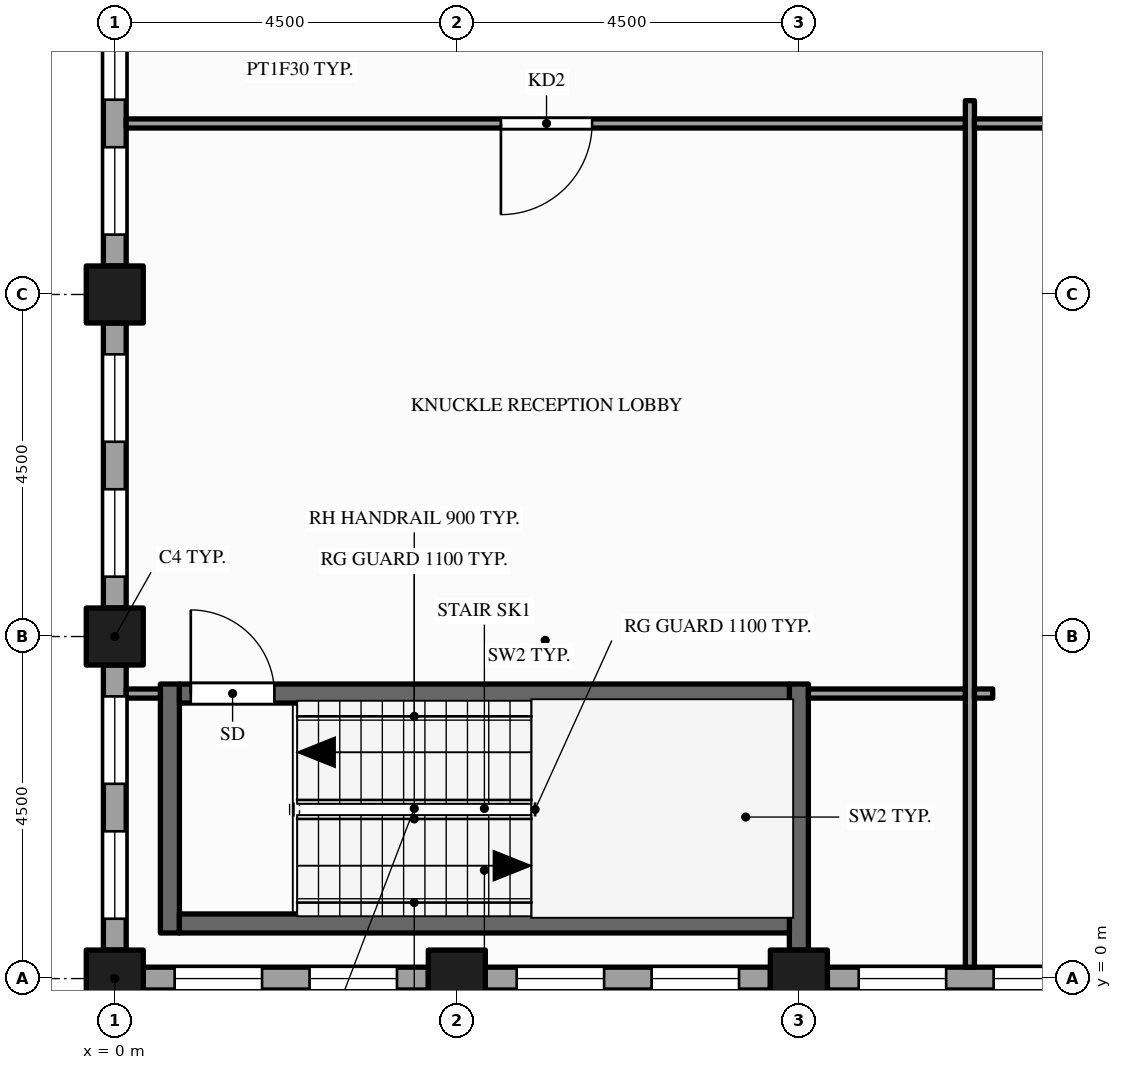
"""IFC4 building model, lengths in metres.
Left out: names, types, materials, properties, quantities, classifications, styles, units other than length and angle.
Written with IfcOpenShell. Run it as: python <this file> out.ifc"""

import sys

from ifc_helpers import new_model, si_unit, direction, frame, frame_2d, origin, origin_2d, place, context, subcontext, project, spatial, rectangle, hollow_rectangle, extrude, element, fill, save


model = new_model("IFC4")
c1 = context("Model", 3, precision=1e-05, world=origin(), true_north=direction((0.0, 1.0)))
c2 = subcontext(c1, "Body", "Model", "MODEL_VIEW")
j1 = project(units=[si_unit("LENGTHUNIT", "METRE"), si_unit("PLANEANGLEUNIT", "RADIAN")], contexts=[c1])
p1 = place(None, origin())
s1 = spatial("IfcSite", under=j1, at=p1, CompositionType="ELEMENT")
p2 = place(p1, origin())
s2 = spatial("IfcBuilding", under=s1, at=p2, CompositionType="ELEMENT")
p3 = place(p2, frame((0.0, 0.0, 235.0)))
s3 = spatial("IfcBuildingStorey", under=s2, at=p3, CompositionType="ELEMENT", Elevation=235.0)
for number, where, z_axis, x_axis in (
    (1, (0.0, 0.0, -0.15), (0.0, 0.0, 1.0), (1.0, 0.0, 0.0)),
    (2, (0.0, 4.5, -0.15), (0.0, 0.0, 1.0), (1.0, 0.0, 0.0)),
    (3, (0.0, 9.0, -0.15), (0.0, 0.0, 1.0), (1.0, 0.0, 0.0)),
    (4, (4.5, 0.0, -0.15), (0.0, 0.0, 1.0), (1.0, 0.0, 0.0)),
    (5, (9.0, 0.0, -0.15), (0.0, 0.0, 1.0), (1.0, 0.0, 0.0)),
):
    element("IfcColumn", number, at=place(p3, frame(where, z_axis=z_axis, x_axis=x_axis)), inside=s3, PredefinedType="COLUMN", context=c2, shape_type="SweptSolid", body=[
        extrude(hollow_rectangle(XDim=0.75, YDim=0.75, WallThickness=0.036, at=origin_2d()), origin(), (0.0, 0.0, 1.0), 4.0),
    ])
p4 = place(p3, frame((0.0, 13.125, 0.0), z_axis=(0.0, 0.0, 1.0), x_axis=(0.0, -1.0, 0.0)))
e6 = element("IfcWall", 6, at=p4, inside=s3, PredefinedType="STANDARD", context=c2, shape_type="SweptSolid", body=[
    extrude(rectangle(XDim=3.75, YDim=0.3, at=frame_2d((1.875, 0.0))), origin(), (0.0, 0.0, 1.0), 3.157),
])
p5 = place(p4, frame((0.413, 0.0, 0.9)))
e7 = element("IfcOpeningElement", 7, at=p5, cuts=e6, PredefinedType="OPENING", context=c2, shape_type="SweptSolid", body=[
    extrude(rectangle(XDim=1.15, YDim=2.0, at=frame_2d((0.575, 1.0))), frame((0.0, 0.16, 0.0), z_axis=(0.0, -1.0, 0.0), x_axis=(1.0, 0.0, 0.0)), (0.0, 0.0, 1.0), 0.32),
])
p6 = place(p4, frame((2.188, 0.0, 0.9)))
e8 = element("IfcOpeningElement", 8, at=p6, cuts=e6, PredefinedType="OPENING", context=c2, shape_type="SweptSolid", body=[
    extrude(rectangle(XDim=1.15, YDim=2.0, at=frame_2d((0.575, 1.0))), frame((0.0, 0.16, 0.0), z_axis=(0.0, -1.0, 0.0), x_axis=(1.0, 0.0, 0.0)), (0.0, 0.0, 1.0), 0.32),
])
p7 = place(p3, frame((0.0, 8.625, 0.0), z_axis=(0.0, 0.0, 1.0), x_axis=(0.0, -1.0, 0.0)))
e9 = element("IfcWall", 9, at=p7, inside=s3, PredefinedType="STANDARD", context=c2, shape_type="SweptSolid", body=[
    extrude(rectangle(XDim=3.75, YDim=0.3, at=frame_2d((1.875, 0.0))), origin(), (0.0, 0.0, 1.0), 3.157),
])
p8 = place(p7, frame((0.413, 0.0, 0.9)))
e10 = element("IfcOpeningElement", 10, at=p8, cuts=e9, PredefinedType="OPENING", context=c2, shape_type="SweptSolid", body=[
    extrude(rectangle(XDim=1.15, YDim=2.0, at=frame_2d((0.575, 1.0))), frame((0.0, 0.16, 0.0), z_axis=(0.0, -1.0, 0.0), x_axis=(1.0, 0.0, 0.0)), (0.0, 0.0, 1.0), 0.32),
])
p9 = place(p7, frame((2.188, 0.0, 0.9)))
e11 = element("IfcOpeningElement", 11, at=p9, cuts=e9, PredefinedType="OPENING", context=c2, shape_type="SweptSolid", body=[
    extrude(rectangle(XDim=1.15, YDim=2.0, at=frame_2d((0.575, 1.0))), frame((0.0, 0.16, 0.0), z_axis=(0.0, -1.0, 0.0), x_axis=(1.0, 0.0, 0.0)), (0.0, 0.0, 1.0), 0.32),
])
p10 = place(p3, frame((0.0, 4.125, 0.0), z_axis=(0.0, 0.0, 1.0), x_axis=(0.0, -1.0, 0.0)))
e12 = element("IfcWall", 12, at=p10, inside=s3, PredefinedType="STANDARD", context=c2, shape_type="SweptSolid", body=[
    extrude(rectangle(XDim=3.75, YDim=0.3, at=frame_2d((1.875, 0.0))), origin(), (0.0, 0.0, 1.0), 3.157),
])
p11 = place(p10, frame((0.413, 0.0, 0.9)))
e13 = element("IfcOpeningElement", 13, at=p11, cuts=e12, PredefinedType="OPENING", context=c2, shape_type="SweptSolid", body=[
    extrude(rectangle(XDim=1.15, YDim=2.0, at=frame_2d((0.575, 1.0))), frame((0.0, 0.16, 0.0), z_axis=(0.0, -1.0, 0.0), x_axis=(1.0, 0.0, 0.0)), (0.0, 0.0, 1.0), 0.32),
])
p12 = place(p10, frame((2.188, 0.0, 0.9)))
e14 = element("IfcOpeningElement", 14, at=p12, cuts=e12, PredefinedType="OPENING", context=c2, shape_type="SweptSolid", body=[
    extrude(rectangle(XDim=1.15, YDim=2.0, at=frame_2d((0.575, 1.0))), frame((0.0, 0.16, 0.0), z_axis=(0.0, -1.0, 0.0), x_axis=(1.0, 0.0, 0.0)), (0.0, 0.0, 1.0), 0.32),
])
p13 = place(p3, frame((0.375, 0.0, 0.0), z_axis=(0.0, 0.0, 1.0), x_axis=(1.0, 0.0, 0.0)))
e15 = element("IfcWall", 15, at=p13, inside=s3, PredefinedType="STANDARD", context=c2, shape_type="SweptSolid", body=[
    extrude(rectangle(XDim=3.75, YDim=0.3, at=frame_2d((1.875, 0.0))), origin(), (0.0, 0.0, 1.0), 3.157),
])
p14 = place(p13, frame((0.413, 0.0, 0.9)))
e16 = element("IfcOpeningElement", 16, at=p14, cuts=e15, PredefinedType="OPENING", context=c2, shape_type="SweptSolid", body=[
    extrude(rectangle(XDim=1.15, YDim=2.0, at=frame_2d((0.575, 1.0))), frame((0.0, 0.16, 0.0), z_axis=(0.0, -1.0, 0.0), x_axis=(1.0, 0.0, 0.0)), (0.0, 0.0, 1.0), 0.32),
])
p15 = place(p13, frame((2.188, 0.0, 0.9)))
e17 = element("IfcOpeningElement", 17, at=p15, cuts=e15, PredefinedType="OPENING", context=c2, shape_type="SweptSolid", body=[
    extrude(rectangle(XDim=1.15, YDim=2.0, at=frame_2d((0.575, 1.0))), frame((0.0, 0.16, 0.0), z_axis=(0.0, -1.0, 0.0), x_axis=(1.0, 0.0, 0.0)), (0.0, 0.0, 1.0), 0.32),
])
p16 = place(p3, frame((4.875, 0.0, 0.0), z_axis=(0.0, 0.0, 1.0), x_axis=(1.0, 0.0, 0.0)))
e18 = element("IfcWall", 18, at=p16, inside=s3, PredefinedType="STANDARD", context=c2, shape_type="SweptSolid", body=[
    extrude(rectangle(XDim=3.75, YDim=0.3, at=frame_2d((1.875, 0.0))), origin(), (0.0, 0.0, 1.0), 3.157),
])
p17 = place(p16, frame((0.413, 0.0, 0.9)))
e19 = element("IfcOpeningElement", 19, at=p17, cuts=e18, PredefinedType="OPENING", context=c2, shape_type="SweptSolid", body=[
    extrude(rectangle(XDim=1.15, YDim=2.0, at=frame_2d((0.575, 1.0))), frame((0.0, 0.16, 0.0), z_axis=(0.0, -1.0, 0.0), x_axis=(1.0, 0.0, 0.0)), (0.0, 0.0, 1.0), 0.32),
])
p18 = place(p16, frame((2.188, 0.0, 0.9)))
e20 = element("IfcOpeningElement", 20, at=p18, cuts=e18, PredefinedType="OPENING", context=c2, shape_type="SweptSolid", body=[
    extrude(rectangle(XDim=1.15, YDim=2.0, at=frame_2d((0.575, 1.0))), frame((0.0, 0.16, 0.0), z_axis=(0.0, -1.0, 0.0), x_axis=(1.0, 0.0, 0.0)), (0.0, 0.0, 1.0), 0.32),
])
p19 = place(p3, frame((9.375, 0.0, 0.0), z_axis=(0.0, 0.0, 1.0), x_axis=(1.0, 0.0, 0.0)))
e21 = element("IfcWall", 21, at=p19, inside=s3, PredefinedType="STANDARD", context=c2, shape_type="SweptSolid", body=[
    extrude(rectangle(XDim=3.75, YDim=0.3, at=frame_2d((1.875, 0.0))), origin(), (0.0, 0.0, 1.0), 2.87),
])
p20 = place(p19, frame((0.413, 0.0, 0.9)))
e22 = element("IfcOpeningElement", 22, at=p20, cuts=e21, PredefinedType="OPENING", context=c2, shape_type="SweptSolid", body=[
    extrude(rectangle(XDim=1.15, YDim=1.75, at=frame_2d((0.575, 0.875))), frame((0.0, 0.16, 0.0), z_axis=(0.0, -1.0, 0.0), x_axis=(1.0, 0.0, 0.0)), (0.0, 0.0, 1.0), 0.32),
])
p21 = place(p19, frame((2.188, 0.0, 0.9)))
e23 = element("IfcOpeningElement", 23, at=p21, cuts=e21, PredefinedType="OPENING", context=c2, shape_type="SweptSolid", body=[
    extrude(rectangle(XDim=1.15, YDim=1.75, at=frame_2d((0.575, 0.875))), frame((0.0, 0.16, 0.0), z_axis=(0.0, -1.0, 0.0), x_axis=(1.0, 0.0, 0.0)), (0.0, 0.0, 1.0), 0.32),
])
p22 = place(p3, frame((0.725, 0.6, 0.0), z_axis=(0.0, 0.0, 1.0), x_axis=(0.0, 1.0, 0.0)))
e24 = element("IfcWall", 24, at=p22, inside=s3, PredefinedType="SHEAR", context=c2, shape_type="SweptSolid", body=[
    extrude(rectangle(XDim=3.275, YDim=0.25, at=frame_2d((1.637, 0.0))), origin(), (0.0, 0.0, 1.0), 3.85),
])
p23 = place(p3, frame((9.0, 0.375, 0.0), z_axis=(0.0, 0.0, 1.0), x_axis=(0.0, 1.0, 0.0)))
e25 = element("IfcWall", 25, at=p23, inside=s3, PredefinedType="SHEAR", context=c2, shape_type="SweptSolid", body=[
    extrude(rectangle(XDim=3.5, YDim=0.25, at=frame_2d((1.75, 0.0))), origin(), (0.0, 0.0, 1.0), 3.85),
])
p24 = place(p3, frame((11.25, 0.15, 0.0), z_axis=(0.0, 0.0, 1.0), x_axis=(0.0, 1.0, 0.0)))
e26 = element("IfcWall", 26, at=p24, inside=s3, PredefinedType="PARTITIONING", context=c2, shape_type="SweptSolid", body=[
    extrude(rectangle(XDim=11.4, YDim=0.12, at=frame_2d((5.7, 0.0))), origin(), (0.0, 0.0, 1.0), 2.87),
])
p25 = place(p3, frame((0.85, 0.725, 0.0), z_axis=(0.0, 0.0, 1.0), x_axis=(1.0, 0.0, 0.0)))
e27 = element("IfcWall", 27, at=p25, inside=s3, PredefinedType="SHEAR", context=c2, shape_type="SweptSolid", body=[
    extrude(rectangle(XDim=8.025, YDim=0.25, at=frame_2d((4.012, 0.0))), origin(), (0.0, 0.0, 1.0), 3.85),
])
p26 = place(p3, frame((0.15, 3.75, 0.0), z_axis=(0.0, 0.0, 1.0), x_axis=(1.0, 0.0, 0.0)))
e28 = element("IfcWall", 28, at=p26, inside=s3, PredefinedType="PARTITIONING", context=c2, shape_type="SweptSolid", body=[
    extrude(rectangle(XDim=0.45, YDim=0.12, at=frame_2d((0.225, 0.0))), origin(), (0.0, 0.0, 1.0), 3.85),
])
p27 = place(p3, frame((0.85, 3.75, 0.0), z_axis=(0.0, 0.0, 1.0), x_axis=(1.0, 0.0, 0.0)))
e29 = element("IfcWall", 29, at=p27, inside=s3, PredefinedType="SHEAR", context=c2, shape_type="SweptSolid", body=[
    extrude(rectangle(XDim=8.025, YDim=0.25, at=frame_2d((4.012, 0.0))), origin(), (0.0, 0.0, 1.0), 3.85),
])
p28 = place(p27, frame((0.15, 0.0, 0.0)))
e30 = element("IfcOpeningElement", 30, at=p28, cuts=e29, PredefinedType="OPENING", context=c2, shape_type="SweptSolid", body=[
    extrude(rectangle(XDim=1.1, YDim=2.1, at=frame_2d((0.55, 1.05))), frame((0.0, 0.135, 0.0), z_axis=(0.0, -1.0, 0.0), x_axis=(1.0, 0.0, 0.0)), (0.0, 0.0, 1.0), 0.27),
])
p29 = place(p3, frame((9.125, 3.75, 0.0), z_axis=(0.0, 0.0, 1.0), x_axis=(1.0, 0.0, 0.0)))
e31 = element("IfcWall", 31, at=p29, inside=s3, PredefinedType="PARTITIONING", context=c2, shape_type="SweptSolid", body=[
    extrude(rectangle(XDim=2.065, YDim=0.12, at=frame_2d((1.032, 0.0))), origin(), (0.0, 0.0, 1.0), 2.87),
])
p30 = place(p3, frame((11.31, 3.75, 0.0), z_axis=(0.0, 0.0, 1.0), x_axis=(1.0, 0.0, 0.0)))
e32 = element("IfcWall", 32, at=p30, inside=s3, PredefinedType="PARTITIONING", context=c2, shape_type="SweptSolid", body=[
    extrude(rectangle(XDim=0.24, YDim=0.12, at=frame_2d((0.12, 0.0))), origin(), (0.0, 0.0, 1.0), 2.87),
])
p31 = place(p3, frame((0.15, 11.25, 0.0), z_axis=(0.0, 0.0, 1.0), x_axis=(1.0, 0.0, 0.0)))
e33 = element("IfcWall", 33, at=p31, inside=s3, PredefinedType="PARTITIONING", context=c2, shape_type="SweptSolid", body=[
    extrude(rectangle(XDim=11.04, YDim=0.12, at=frame_2d((5.52, 0.0))), origin(), (0.0, 0.0, 1.0), 2.87),
])
p32 = place(p31, frame((4.93, 0.0, 0.0)))
e34 = element("IfcOpeningElement", 34, at=p32, cuts=e33, PredefinedType="OPENING", context=c2, shape_type="SweptSolid", body=[
    extrude(rectangle(XDim=1.2, YDim=2.1, at=frame_2d((0.6, 1.05))), frame((0.0, 0.07, 0.0), z_axis=(0.0, -1.0, 0.0), x_axis=(1.0, 0.0, 0.0)), (0.0, 0.0, 1.0), 0.14),
])
p33 = place(p3, frame((11.31, 11.25, 0.0), z_axis=(0.0, 0.0, 1.0), x_axis=(1.0, 0.0, 0.0)))
e35 = element("IfcWall", 35, at=p33, inside=s3, PredefinedType="PARTITIONING", context=c2, shape_type="SweptSolid", body=[
    extrude(rectangle(XDim=4.38, YDim=0.12, at=frame_2d((2.19, 0.0))), origin(), (0.0, 0.0, 1.0), 2.87),
])
p34 = place(p33, frame((1.69, 0.0, 0.0)))
e36 = element("IfcOpeningElement", 36, at=p34, cuts=e35, PredefinedType="OPENING", context=c2, shape_type="SweptSolid", body=[
    extrude(rectangle(XDim=1.0, YDim=2.1, at=frame_2d((0.5, 1.05))), frame((0.0, 0.07, 0.0), z_axis=(0.0, -1.0, 0.0), x_axis=(1.0, 0.0, 0.0)), (0.0, 0.0, 1.0), 0.14),
])
p35 = place(p5, origin())
e37 = element("IfcWindow", 37, at=p35, inside=s3, PartitioningType="SINGLE_PANEL", PredefinedType="WINDOW", context=c2, shape_type="SweptSolid", body=[
    extrude(rectangle(XDim=1.15, YDim=2.0, at=frame_2d((0.575, 1.0))), frame((0.0, 0.03, 0.0), z_axis=(0.0, -1.0, 0.0), x_axis=(1.0, 0.0, 0.0)), (0.0, 0.0, 1.0), 0.06),
])
fill(e7, e37)
p36 = place(p6, origin())
e38 = element("IfcWindow", 38, at=p36, inside=s3, PartitioningType="SINGLE_PANEL", PredefinedType="WINDOW", context=c2, shape_type="SweptSolid", body=[
    extrude(rectangle(XDim=1.15, YDim=2.0, at=frame_2d((0.575, 1.0))), frame((0.0, 0.03, 0.0), z_axis=(0.0, -1.0, 0.0), x_axis=(1.0, 0.0, 0.0)), (0.0, 0.0, 1.0), 0.06),
])
fill(e8, e38)
p37 = place(p8, origin())
e39 = element("IfcWindow", 39, at=p37, inside=s3, PartitioningType="SINGLE_PANEL", PredefinedType="WINDOW", context=c2, shape_type="SweptSolid", body=[
    extrude(rectangle(XDim=1.15, YDim=2.0, at=frame_2d((0.575, 1.0))), frame((0.0, 0.03, 0.0), z_axis=(0.0, -1.0, 0.0), x_axis=(1.0, 0.0, 0.0)), (0.0, 0.0, 1.0), 0.06),
])
fill(e10, e39)
p38 = place(p9, origin())
e40 = element("IfcWindow", 40, at=p38, inside=s3, PartitioningType="SINGLE_PANEL", PredefinedType="WINDOW", context=c2, shape_type="SweptSolid", body=[
    extrude(rectangle(XDim=1.15, YDim=2.0, at=frame_2d((0.575, 1.0))), frame((0.0, 0.03, 0.0), z_axis=(0.0, -1.0, 0.0), x_axis=(1.0, 0.0, 0.0)), (0.0, 0.0, 1.0), 0.06),
])
fill(e11, e40)
p39 = place(p11, origin())
e41 = element("IfcWindow", 41, at=p39, inside=s3, PartitioningType="SINGLE_PANEL", PredefinedType="WINDOW", context=c2, shape_type="SweptSolid", body=[
    extrude(rectangle(XDim=1.15, YDim=2.0, at=frame_2d((0.575, 1.0))), frame((0.0, 0.03, 0.0), z_axis=(0.0, -1.0, 0.0), x_axis=(1.0, 0.0, 0.0)), (0.0, 0.0, 1.0), 0.06),
])
fill(e13, e41)
p40 = place(p12, origin())
e42 = element("IfcWindow", 42, at=p40, inside=s3, PartitioningType="SINGLE_PANEL", PredefinedType="WINDOW", context=c2, shape_type="SweptSolid", body=[
    extrude(rectangle(XDim=1.15, YDim=2.0, at=frame_2d((0.575, 1.0))), frame((0.0, 0.03, 0.0), z_axis=(0.0, -1.0, 0.0), x_axis=(1.0, 0.0, 0.0)), (0.0, 0.0, 1.0), 0.06),
])
fill(e14, e42)
p41 = place(p14, origin())
e43 = element("IfcWindow", 43, at=p41, inside=s3, PartitioningType="SINGLE_PANEL", PredefinedType="WINDOW", context=c2, shape_type="SweptSolid", body=[
    extrude(rectangle(XDim=1.15, YDim=2.0, at=frame_2d((0.575, 1.0))), frame((0.0, 0.03, 0.0), z_axis=(0.0, -1.0, 0.0), x_axis=(1.0, 0.0, 0.0)), (0.0, 0.0, 1.0), 0.06),
])
fill(e16, e43)
p42 = place(p15, origin())
e44 = element("IfcWindow", 44, at=p42, inside=s3, PartitioningType="SINGLE_PANEL", PredefinedType="WINDOW", context=c2, shape_type="SweptSolid", body=[
    extrude(rectangle(XDim=1.15, YDim=2.0, at=frame_2d((0.575, 1.0))), frame((0.0, 0.03, 0.0), z_axis=(0.0, -1.0, 0.0), x_axis=(1.0, 0.0, 0.0)), (0.0, 0.0, 1.0), 0.06),
])
fill(e17, e44)
p43 = place(p17, origin())
e45 = element("IfcWindow", 45, at=p43, inside=s3, PartitioningType="SINGLE_PANEL", PredefinedType="WINDOW", context=c2, shape_type="SweptSolid", body=[
    extrude(rectangle(XDim=1.15, YDim=2.0, at=frame_2d((0.575, 1.0))), frame((0.0, 0.03, 0.0), z_axis=(0.0, -1.0, 0.0), x_axis=(1.0, 0.0, 0.0)), (0.0, 0.0, 1.0), 0.06),
])
fill(e19, e45)
p44 = place(p18, origin())
e46 = element("IfcWindow", 46, at=p44, inside=s3, PartitioningType="SINGLE_PANEL", PredefinedType="WINDOW", context=c2, shape_type="SweptSolid", body=[
    extrude(rectangle(XDim=1.15, YDim=2.0, at=frame_2d((0.575, 1.0))), frame((0.0, 0.03, 0.0), z_axis=(0.0, -1.0, 0.0), x_axis=(1.0, 0.0, 0.0)), (0.0, 0.0, 1.0), 0.06),
])
fill(e20, e46)
p45 = place(p20, origin())
e47 = element("IfcWindow", 47, at=p45, inside=s3, PartitioningType="SINGLE_PANEL", PredefinedType="WINDOW", context=c2, shape_type="SweptSolid", body=[
    extrude(rectangle(XDim=1.15, YDim=1.75, at=frame_2d((0.575, 0.875))), frame((0.0, 0.03, 0.0), z_axis=(0.0, -1.0, 0.0), x_axis=(1.0, 0.0, 0.0)), (0.0, 0.0, 1.0), 0.06),
])
fill(e22, e47)
p46 = place(p21, origin())
e48 = element("IfcWindow", 48, at=p46, inside=s3, PartitioningType="SINGLE_PANEL", PredefinedType="WINDOW", context=c2, shape_type="SweptSolid", body=[
    extrude(rectangle(XDim=1.15, YDim=1.75, at=frame_2d((0.575, 0.875))), frame((0.0, 0.03, 0.0), z_axis=(0.0, -1.0, 0.0), x_axis=(1.0, 0.0, 0.0)), (0.0, 0.0, 1.0), 0.06),
])
fill(e23, e48)
p47 = place(p28, origin())
e49 = element("IfcDoor", 49, at=p47, inside=s3, OperationType="SINGLE_SWING_LEFT", PredefinedType="DOOR", context=c2, shape_type="SweptSolid", body=[
    extrude(rectangle(XDim=1.1, YDim=2.1, at=frame_2d((0.55, 1.05))), frame((0.0, 0.025, 0.0), z_axis=(0.0, -1.0, 0.0), x_axis=(1.0, 0.0, 0.0)), (0.0, 0.0, 1.0), 0.05),
])
fill(e30, e49)
p48 = place(p32, origin())
e50 = element("IfcDoor", 50, at=p48, inside=s3, OperationType="SINGLE_SWING_LEFT", PredefinedType="DOOR", context=c2, shape_type="SweptSolid", body=[
    extrude(rectangle(XDim=1.2, YDim=2.1, at=frame_2d((0.6, 1.05))), frame((0.0, 0.025, 0.0), z_axis=(0.0, -1.0, 0.0), x_axis=(1.0, 0.0, 0.0)), (0.0, 0.0, 1.0), 0.05),
])
fill(e34, e50)
save(model, sys.argv[1])
